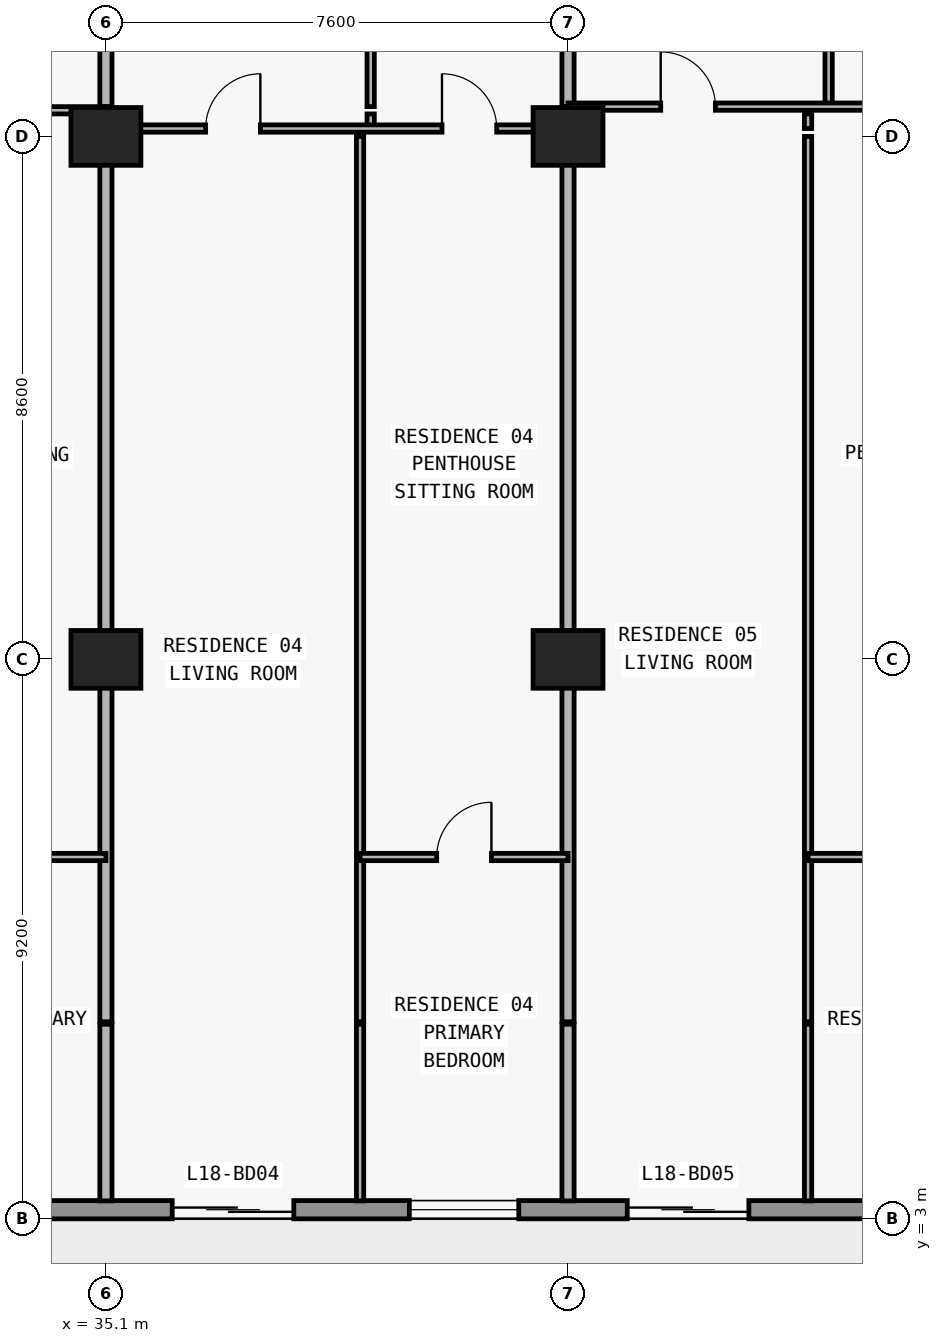
"""IFC4 building model, lengths in metres.
Left out: names, types, materials, properties, quantities, classifications, styles, units other than length and angle.
Written with IfcOpenShell. Run it as: python <this file> out.ifc"""

import sys

from ifc_helpers import new_model, si_unit, direction, frame, frame_2d, origin, origin_2d, place, context, subcontext, project, spatial, rectangle, extrude, element, fill, save


model = new_model("IFC4")
c1 = context("Model", 3, precision=1e-05, world=origin(), true_north=direction((0.0, 1.0)))
c2 = subcontext(c1, "Body", "Model", "MODEL_VIEW")
j1 = project(units=[si_unit("LENGTHUNIT", "METRE"), si_unit("PLANEANGLEUNIT", "RADIAN")], contexts=[c1])
p1 = place(None, origin())
s1 = spatial("IfcSite", under=j1, at=p1, CompositionType="ELEMENT")
p2 = place(p1, origin())
s2 = spatial("IfcBuilding", under=s1, at=p2, CompositionType="ELEMENT")
p3 = place(p2, frame((0.0, 0.0, 69.6)))
s3 = spatial("IfcBuildingStorey", under=s2, at=p3, CompositionType="ELEMENT", Elevation=69.6)
for number, where, z_axis, x_axis in (
    (1, (35.1, 12.2, 0.0), (0.0, 0.0, 1.0), (1.0, 0.0, 0.0)),
    (2, (42.7, 12.2, 0.0), (0.0, 0.0, 1.0), (1.0, 0.0, 0.0)),
    (3, (35.1, 20.8, 0.0), (0.0, 0.0, 1.0), (1.0, 0.0, 0.0)),
    (4, (42.7, 20.8, 0.0), (0.0, 0.0, 1.0), (1.0, 0.0, 0.0)),
):
    element("IfcColumn", number, at=place(p3, frame(where, z_axis=z_axis, x_axis=x_axis)), inside=s3, PredefinedType="COLUMN", context=c2, shape_type="SweptSolid", body=[
        extrude(rectangle(XDim=1.15, YDim=0.95, at=origin_2d()), origin(), (0.0, 0.0, 1.0), 3.05),
    ])
p4 = place(p3, frame((72.7, 3.15, 0.0), z_axis=(0.0, 0.0, 1.0), x_axis=(-1.0, 0.0, 0.0)))
e5 = element("IfcWall", 5, at=p4, inside=s3, PredefinedType="STANDARD", context=c2, shape_type="SweptSolid", body=[
    extrude(rectangle(XDim=67.6, YDim=0.3, at=frame_2d((33.8, 0.0))), origin(), (0.0, 0.0, 1.0), 3.05),
])
p5 = place(p4, frame((59.826, 0.0, 0.0)))
e6 = element("IfcOpeningElement", 6, at=p5, cuts=e5, PredefinedType="OPENING", context=c2, shape_type="SweptSolid", body=[
    extrude(rectangle(XDim=2.0, YDim=2.3, at=frame_2d((1.0, 1.15))), frame((0.0, 0.16, 0.0), z_axis=(0.0, -1.0, 0.0), x_axis=(1.0, 0.0, 0.0)), (0.0, 0.0, 1.0), 0.32),
])
p6 = place(p4, frame((55.526, 0.0, 0.85)))
e7 = element("IfcOpeningElement", 7, at=p6, cuts=e5, PredefinedType="OPENING", context=c2, shape_type="SweptSolid", body=[
    extrude(rectangle(XDim=2.2, YDim=1.55, at=frame_2d((1.1, 0.775))), frame((0.0, 0.16, 0.0), z_axis=(0.0, -1.0, 0.0), x_axis=(1.0, 0.0, 0.0)), (0.0, 0.0, 1.0), 0.32),
])
p7 = place(p4, frame((51.09, 0.0, 0.0)))
e8 = element("IfcOpeningElement", 8, at=p7, cuts=e5, PredefinedType="OPENING", context=c2, shape_type="SweptSolid", body=[
    extrude(rectangle(XDim=2.0, YDim=2.3, at=frame_2d((1.0, 1.15))), frame((0.0, 0.16, 0.0), z_axis=(0.0, -1.0, 0.0), x_axis=(1.0, 0.0, 0.0)), (0.0, 0.0, 1.0), 0.32),
])
p8 = place(p4, frame((46.99, 0.0, 0.85)))
e9 = element("IfcOpeningElement", 9, at=p8, cuts=e5, PredefinedType="OPENING", context=c2, shape_type="SweptSolid", body=[
    extrude(rectangle(XDim=1.8, YDim=1.55, at=frame_2d((0.9, 0.775))), frame((0.0, 0.16, 0.0), z_axis=(0.0, -1.0, 0.0), x_axis=(1.0, 0.0, 0.0)), (0.0, 0.0, 1.0), 0.32),
])
p9 = place(p4, frame((43.026, 0.0, 0.0)))
e10 = element("IfcOpeningElement", 10, at=p9, cuts=e5, PredefinedType="OPENING", context=c2, shape_type="SweptSolid", body=[
    extrude(rectangle(XDim=2.0, YDim=2.3, at=frame_2d((1.0, 1.15))), frame((0.0, 0.16, 0.0), z_axis=(0.0, -1.0, 0.0), x_axis=(1.0, 0.0, 0.0)), (0.0, 0.0, 1.0), 0.32),
])
p10 = place(p4, frame((38.726, 0.0, 0.85)))
e11 = element("IfcOpeningElement", 11, at=p10, cuts=e5, PredefinedType="OPENING", context=c2, shape_type="SweptSolid", body=[
    extrude(rectangle(XDim=2.2, YDim=1.55, at=frame_2d((1.1, 0.775))), frame((0.0, 0.16, 0.0), z_axis=(0.0, -1.0, 0.0), x_axis=(1.0, 0.0, 0.0)), (0.0, 0.0, 1.0), 0.32),
])
p11 = place(p4, frame((34.51, 0.0, 0.0)))
e12 = element("IfcOpeningElement", 12, at=p11, cuts=e5, PredefinedType="OPENING", context=c2, shape_type="SweptSolid", body=[
    extrude(rectangle(XDim=2.0, YDim=2.3, at=frame_2d((1.0, 1.15))), frame((0.0, 0.16, 0.0), z_axis=(0.0, -1.0, 0.0), x_axis=(1.0, 0.0, 0.0)), (0.0, 0.0, 1.0), 0.32),
])
p12 = place(p4, frame((30.81, 0.0, 0.85)))
e13 = element("IfcOpeningElement", 13, at=p12, cuts=e5, PredefinedType="OPENING", context=c2, shape_type="SweptSolid", body=[
    extrude(rectangle(XDim=1.8, YDim=1.55, at=frame_2d((0.9, 0.775))), frame((0.0, 0.16, 0.0), z_axis=(0.0, -1.0, 0.0), x_axis=(1.0, 0.0, 0.0)), (0.0, 0.0, 1.0), 0.32),
])
p13 = place(p4, frame((27.026, 0.0, 0.0)))
e14 = element("IfcOpeningElement", 14, at=p13, cuts=e5, PredefinedType="OPENING", context=c2, shape_type="SweptSolid", body=[
    extrude(rectangle(XDim=2.0, YDim=2.3, at=frame_2d((1.0, 1.15))), frame((0.0, 0.16, 0.0), z_axis=(0.0, -1.0, 0.0), x_axis=(1.0, 0.0, 0.0)), (0.0, 0.0, 1.0), 0.32),
])
p14 = place(p4, frame((22.726, 0.0, 0.85)))
e15 = element("IfcOpeningElement", 15, at=p14, cuts=e5, PredefinedType="OPENING", context=c2, shape_type="SweptSolid", body=[
    extrude(rectangle(XDim=2.2, YDim=1.55, at=frame_2d((1.1, 0.775))), frame((0.0, 0.16, 0.0), z_axis=(0.0, -1.0, 0.0), x_axis=(1.0, 0.0, 0.0)), (0.0, 0.0, 1.0), 0.32),
])
p15 = place(p4, frame((18.29, 0.0, 0.0)))
e16 = element("IfcOpeningElement", 16, at=p15, cuts=e5, PredefinedType="OPENING", context=c2, shape_type="SweptSolid", body=[
    extrude(rectangle(XDim=2.0, YDim=2.3, at=frame_2d((1.0, 1.15))), frame((0.0, 0.16, 0.0), z_axis=(0.0, -1.0, 0.0), x_axis=(1.0, 0.0, 0.0)), (0.0, 0.0, 1.0), 0.32),
])
p16 = place(p4, frame((14.19, 0.0, 0.85)))
e17 = element("IfcOpeningElement", 17, at=p16, cuts=e5, PredefinedType="OPENING", context=c2, shape_type="SweptSolid", body=[
    extrude(rectangle(XDim=1.8, YDim=1.55, at=frame_2d((0.9, 0.775))), frame((0.0, 0.16, 0.0), z_axis=(0.0, -1.0, 0.0), x_axis=(1.0, 0.0, 0.0)), (0.0, 0.0, 1.0), 0.32),
])
p17 = place(p4, frame((10.226, 0.0, 0.0)))
e18 = element("IfcOpeningElement", 18, at=p17, cuts=e5, PredefinedType="OPENING", context=c2, shape_type="SweptSolid", body=[
    extrude(rectangle(XDim=2.0, YDim=2.3, at=frame_2d((1.0, 1.15))), frame((0.0, 0.16, 0.0), z_axis=(0.0, -1.0, 0.0), x_axis=(1.0, 0.0, 0.0)), (0.0, 0.0, 1.0), 0.32),
])
p18 = place(p4, frame((5.926, 0.0, 0.85)))
e19 = element("IfcOpeningElement", 19, at=p18, cuts=e5, PredefinedType="OPENING", context=c2, shape_type="SweptSolid", body=[
    extrude(rectangle(XDim=2.2, YDim=1.55, at=frame_2d((1.1, 0.775))), frame((0.0, 0.16, 0.0), z_axis=(0.0, -1.0, 0.0), x_axis=(1.0, 0.0, 0.0)), (0.0, 0.0, 1.0), 0.32),
])
p19 = place(p3, frame((35.1, 3.295, 0.0), z_axis=(0.0, 0.0, 1.0), x_axis=(0.0, 1.0, 0.0)))
e20 = element("IfcWall", 20, at=p19, inside=s3, PredefinedType="PARTITIONING", context=c2, shape_type="SweptSolid", body=[
    extrude(rectangle(XDim=2.905, YDim=0.2, at=frame_2d((1.453, 0.0))), origin(), (0.0, 0.0, 1.0), 3.05),
])
p20 = place(p3, frame((35.1, 6.24, 0.0), z_axis=(0.0, 0.0, 1.0), x_axis=(0.0, 1.0, 0.0)))
e21 = element("IfcWall", 21, at=p20, inside=s3, PredefinedType="PARTITIONING", context=c2, shape_type="SweptSolid", body=[
    extrude(rectangle(XDim=14.56, YDim=0.2, at=frame_2d((7.28, 0.0))), origin(), (0.0, 0.0, 1.0), 2.11),
])
p21 = place(p3, frame((35.1, 20.93, 0.0), z_axis=(0.0, 0.0, 1.0), x_axis=(0.0, 1.0, 0.0)))
e22 = element("IfcWall", 22, at=p21, inside=s3, PredefinedType="PARTITIONING", context=c2, shape_type="SweptSolid", body=[
    extrude(rectangle(XDim=0.24, YDim=0.2, at=frame_2d((0.12, 0.0))), origin(), (0.0, 0.0, 1.0), 3.05),
])
p22 = place(p3, frame((35.1, 21.29, 0.0), z_axis=(0.0, 0.0, 1.0), x_axis=(0.0, 1.0, 0.0)))
e23 = element("IfcWall", 23, at=p22, inside=s3, PredefinedType="PARTITIONING", context=c2, shape_type="SweptSolid", body=[
    extrude(rectangle(XDim=4.69, YDim=0.2, at=frame_2d((2.345, 0.0))), origin(), (0.0, 0.0, 1.0), 2.11),
])
p23 = place(p3, frame((39.28, 3.295, 0.0), z_axis=(0.0, 0.0, 1.0), x_axis=(0.0, 1.0, 0.0)))
e24 = element("IfcWall", 24, at=p23, inside=s3, PredefinedType="PARTITIONING", context=c2, shape_type="SweptSolid", body=[
    extrude(rectangle(XDim=2.905, YDim=0.12, at=frame_2d((1.453, 0.0))), origin(), (0.0, 0.0, 1.0), 3.05),
])
p24 = place(p3, frame((39.28, 6.24, 0.0), z_axis=(0.0, 0.0, 1.0), x_axis=(0.0, 1.0, 0.0)))
e25 = element("IfcWall", 25, at=p24, inside=s3, PredefinedType="PARTITIONING", context=c2, shape_type="SweptSolid", body=[
    extrude(rectangle(XDim=14.56, YDim=0.12, at=frame_2d((7.28, 0.0))), origin(), (0.0, 0.0, 1.0), 3.05),
])
p25 = place(p3, frame((39.454, 20.93, 0.0), z_axis=(0.0, 0.0, 1.0), x_axis=(0.0, 1.0, 0.0)))
e26 = element("IfcWall", 26, at=p25, inside=s3, PredefinedType="PARTITIONING", context=c2, shape_type="SweptSolid", body=[
    extrude(rectangle(XDim=0.24, YDim=0.12, at=frame_2d((0.12, 0.0))), origin(), (0.0, 0.0, 1.0), 3.05),
])
p26 = place(p3, frame((39.454, 21.29, 0.0), z_axis=(0.0, 0.0, 1.0), x_axis=(0.0, 1.0, 0.0)))
e27 = element("IfcWall", 27, at=p26, inside=s3, PredefinedType="PARTITIONING", context=c2, shape_type="SweptSolid", body=[
    extrude(rectangle(XDim=4.69, YDim=0.12, at=frame_2d((2.345, 0.0))), origin(), (0.0, 0.0, 1.0), 3.05),
])
p27 = place(p26, frame((1.895, 0.0, 0.0)))
e28 = element("IfcOpeningElement", 28, at=p27, cuts=e27, PredefinedType="OPENING", context=c2, shape_type="SweptSolid", body=[
    extrude(rectangle(XDim=0.9, YDim=2.15, at=frame_2d((0.45, 1.075))), frame((0.0, 0.07, 0.0), z_axis=(0.0, -1.0, 0.0), x_axis=(1.0, 0.0, 0.0)), (0.0, 0.0, 1.0), 0.14),
])
p28 = place(p3, frame((42.7, 3.295, 0.0), z_axis=(0.0, 0.0, 1.0), x_axis=(0.0, 1.0, 0.0)))
e29 = element("IfcWall", 29, at=p28, inside=s3, PredefinedType="PARTITIONING", context=c2, shape_type="SweptSolid", body=[
    extrude(rectangle(XDim=2.905, YDim=0.2, at=frame_2d((1.453, 0.0))), origin(), (0.0, 0.0, 1.0), 3.05),
])
p29 = place(p3, frame((42.7, 6.24, 0.0), z_axis=(0.0, 0.0, 1.0), x_axis=(0.0, 1.0, 0.0)))
e30 = element("IfcWall", 30, at=p29, inside=s3, PredefinedType="PARTITIONING", context=c2, shape_type="SweptSolid", body=[
    extrude(rectangle(XDim=14.56, YDim=0.2, at=frame_2d((7.28, 0.0))), origin(), (0.0, 0.0, 1.0), 2.11),
])
p30 = place(p3, frame((42.7, 20.93, 0.0), z_axis=(0.0, 0.0, 1.0), x_axis=(0.0, 1.0, 0.0)))
e31 = element("IfcWall", 31, at=p30, inside=s3, PredefinedType="PARTITIONING", context=c2, shape_type="SweptSolid", body=[
    extrude(rectangle(XDim=0.24, YDim=0.2, at=frame_2d((0.12, 0.0))), origin(), (0.0, 0.0, 1.0), 3.05),
])
p31 = place(p3, frame((42.7, 21.29, 0.0), z_axis=(0.0, 0.0, 1.0), x_axis=(0.0, 1.0, 0.0)))
e32 = element("IfcWall", 32, at=p31, inside=s3, PredefinedType="PARTITIONING", context=c2, shape_type="SweptSolid", body=[
    extrude(rectangle(XDim=4.69, YDim=0.2, at=frame_2d((2.345, 0.0))), origin(), (0.0, 0.0, 1.0), 2.11),
])
p32 = place(p3, frame((46.648, 3.295, 0.0), z_axis=(0.0, 0.0, 1.0), x_axis=(0.0, 1.0, 0.0)))
e33 = element("IfcWall", 33, at=p32, inside=s3, PredefinedType="PARTITIONING", context=c2, shape_type="SweptSolid", body=[
    extrude(rectangle(XDim=2.905, YDim=0.12, at=frame_2d((1.453, 0.0))), origin(), (0.0, 0.0, 1.0), 3.05),
])
p33 = place(p3, frame((46.648, 6.24, 0.0), z_axis=(0.0, 0.0, 1.0), x_axis=(0.0, 1.0, 0.0)))
e34 = element("IfcWall", 34, at=p33, inside=s3, PredefinedType="PARTITIONING", context=c2, shape_type="SweptSolid", body=[
    extrude(rectangle(XDim=14.56, YDim=0.12, at=frame_2d((7.28, 0.0))), origin(), (0.0, 0.0, 1.0), 3.05),
])
p34 = place(p3, frame((46.648, 20.93, 0.0), z_axis=(0.0, 0.0, 1.0), x_axis=(0.0, 1.0, 0.0)))
e35 = element("IfcWall", 35, at=p34, inside=s3, PredefinedType="PARTITIONING", context=c2, shape_type="SweptSolid", body=[
    extrude(rectangle(XDim=0.24, YDim=0.12, at=frame_2d((0.12, 0.0))), origin(), (0.0, 0.0, 1.0), 3.05),
])
p35 = place(p3, frame((46.986, 21.29, 0.0), z_axis=(0.0, 0.0, 1.0), x_axis=(0.0, 1.0, 0.0)))
e36 = element("IfcWall", 36, at=p35, inside=s3, PredefinedType="PARTITIONING", context=c2, shape_type="SweptSolid", body=[
    extrude(rectangle(XDim=4.69, YDim=0.12, at=frame_2d((2.345, 0.0))), origin(), (0.0, 0.0, 1.0), 3.05),
])
p36 = place(p35, frame((1.895, 0.0, 0.0)))
e37 = element("IfcOpeningElement", 37, at=p36, cuts=e36, PredefinedType="OPENING", context=c2, shape_type="SweptSolid", body=[
    extrude(rectangle(XDim=0.9, YDim=2.15, at=frame_2d((0.45, 1.075))), frame((0.0, 0.07, 0.0), z_axis=(0.0, -1.0, 0.0), x_axis=(1.0, 0.0, 0.0)), (0.0, 0.0, 1.0), 0.14),
])
p37 = place(p3, frame((30.648, 8.95, 0.0), z_axis=(0.0, 0.0, 1.0), x_axis=(1.0, 0.0, 0.0)))
e38 = element("IfcWall", 38, at=p37, inside=s3, PredefinedType="PARTITIONING", context=c2, shape_type="SweptSolid", body=[
    extrude(rectangle(XDim=4.452, YDim=0.12, at=frame_2d((2.226, 0.0))), origin(), (0.0, 0.0, 1.0), 3.05),
])
p38 = place(p37, frame((1.776, 0.0, 0.0)))
e39 = element("IfcOpeningElement", 39, at=p38, cuts=e38, PredefinedType="OPENING", context=c2, shape_type="SweptSolid", body=[
    extrude(rectangle(XDim=0.9, YDim=2.15, at=frame_2d((0.45, 1.075))), frame((0.0, 0.07, 0.0), z_axis=(0.0, -1.0, 0.0), x_axis=(1.0, 0.0, 0.0)), (0.0, 0.0, 1.0), 0.14),
])
p39 = place(p3, frame((39.28, 8.95, 0.0), z_axis=(0.0, 0.0, 1.0), x_axis=(1.0, 0.0, 0.0)))
e40 = element("IfcWall", 40, at=p39, inside=s3, PredefinedType="PARTITIONING", context=c2, shape_type="SweptSolid", body=[
    extrude(rectangle(XDim=3.42, YDim=0.12, at=frame_2d((1.71, 0.0))), origin(), (0.0, 0.0, 1.0), 3.05),
])
p40 = place(p39, frame((1.26, 0.0, 0.0)))
e41 = element("IfcOpeningElement", 41, at=p40, cuts=e40, PredefinedType="OPENING", context=c2, shape_type="SweptSolid", body=[
    extrude(rectangle(XDim=0.9, YDim=2.15, at=frame_2d((0.45, 1.075))), frame((0.0, 0.07, 0.0), z_axis=(0.0, -1.0, 0.0), x_axis=(1.0, 0.0, 0.0)), (0.0, 0.0, 1.0), 0.14),
])
p41 = place(p3, frame((46.648, 8.95, 0.0), z_axis=(0.0, 0.0, 1.0), x_axis=(1.0, 0.0, 0.0)))
e42 = element("IfcWall", 42, at=p41, inside=s3, PredefinedType="PARTITIONING", context=c2, shape_type="SweptSolid", body=[
    extrude(rectangle(XDim=4.452, YDim=0.12, at=frame_2d((2.226, 0.0))), origin(), (0.0, 0.0, 1.0), 3.05),
])
p42 = place(p41, frame((1.776, 0.0, 0.0)))
e43 = element("IfcOpeningElement", 43, at=p42, cuts=e42, PredefinedType="OPENING", context=c2, shape_type="SweptSolid", body=[
    extrude(rectangle(XDim=0.9, YDim=2.15, at=frame_2d((0.45, 1.075))), frame((0.0, 0.07, 0.0), z_axis=(0.0, -1.0, 0.0), x_axis=(1.0, 0.0, 0.0)), (0.0, 0.0, 1.0), 0.14),
])
p43 = place(p3, frame((35.1, 20.93, 0.0), z_axis=(0.0, 0.0, 1.0), x_axis=(1.0, 0.0, 0.0)))
e44 = element("IfcWall", 44, at=p43, inside=s3, PredefinedType="PARTITIONING", context=c2, shape_type="SweptSolid", body=[
    extrude(rectangle(XDim=7.6, YDim=0.12, at=frame_2d((3.8, 0.0))), origin(), (0.0, 0.0, 1.0), 2.11),
])
p44 = place(p43, frame((1.64, 0.0, 0.0)))
e45 = element("IfcOpeningElement", 45, at=p44, cuts=e44, PredefinedType="OPENING", context=c2, shape_type="SweptSolid", body=[
    extrude(rectangle(XDim=0.9, YDim=2.06, at=frame_2d((0.45, 1.03))), frame((0.0, 0.07, 0.0), z_axis=(0.0, -1.0, 0.0), x_axis=(1.0, 0.0, 0.0)), (0.0, 0.0, 1.0), 0.14),
])
p45 = place(p43, frame((5.527, 0.0, 0.0)))
e46 = element("IfcOpeningElement", 46, at=p45, cuts=e44, PredefinedType="OPENING", context=c2, shape_type="SweptSolid", body=[
    extrude(rectangle(XDim=0.9, YDim=2.06, at=frame_2d((0.45, 1.03))), frame((0.0, 0.07, 0.0), z_axis=(0.0, -1.0, 0.0), x_axis=(1.0, 0.0, 0.0)), (0.0, 0.0, 1.0), 0.14),
])
p46 = place(p3, frame((26.97, 21.23, 0.0), z_axis=(0.0, 0.0, 1.0), x_axis=(1.0, 0.0, 0.0)))
e47 = element("IfcWall", 47, at=p46, inside=s3, PredefinedType="PARTITIONING", context=c2, shape_type="SweptSolid", body=[
    extrude(rectangle(XDim=8.13, YDim=0.12, at=frame_2d((4.065, 0.0))), origin(), (0.0, 0.0, 1.0), 3.05),
])
p47 = place(p46, frame((1.389, 0.0, 0.0)))
e48 = element("IfcOpeningElement", 48, at=p47, cuts=e47, PredefinedType="OPENING", context=c2, shape_type="SweptSolid", body=[
    extrude(rectangle(XDim=0.9, YDim=2.15, at=frame_2d((0.45, 1.075))), frame((0.0, 0.07, 0.0), z_axis=(0.0, -1.0, 0.0), x_axis=(1.0, 0.0, 0.0)), (0.0, 0.0, 1.0), 0.14),
])
p48 = place(p46, frame((5.748, 0.0, 0.0)))
e49 = element("IfcOpeningElement", 49, at=p48, cuts=e47, PredefinedType="OPENING", context=c2, shape_type="SweptSolid", body=[
    extrude(rectangle(XDim=0.9, YDim=2.15, at=frame_2d((0.45, 1.075))), frame((0.0, 0.07, 0.0), z_axis=(0.0, -1.0, 0.0), x_axis=(1.0, 0.0, 0.0)), (0.0, 0.0, 1.0), 0.14),
])
p49 = place(p3, frame((42.7, 21.29, 0.0), z_axis=(0.0, 0.0, 1.0), x_axis=(1.0, 0.0, 0.0)))
e50 = element("IfcWall", 50, at=p49, inside=s3, PredefinedType="PARTITIONING", context=c2, shape_type="SweptSolid", body=[
    extrude(rectangle(XDim=8.13, YDim=0.12, at=frame_2d((4.065, 0.0))), origin(), (0.0, 0.0, 1.0), 3.05),
])
p50 = place(p49, frame((1.524, 0.0, 0.0)))
e51 = element("IfcOpeningElement", 51, at=p50, cuts=e50, PredefinedType="OPENING", context=c2, shape_type="SweptSolid", body=[
    extrude(rectangle(XDim=0.9, YDim=2.15, at=frame_2d((0.45, 1.075))), frame((0.0, 0.07, 0.0), z_axis=(0.0, -1.0, 0.0), x_axis=(1.0, 0.0, 0.0)), (0.0, 0.0, 1.0), 0.14),
])
p51 = place(p49, frame((5.758, 0.0, 0.0)))
e52 = element("IfcOpeningElement", 52, at=p51, cuts=e50, PredefinedType="OPENING", context=c2, shape_type="SweptSolid", body=[
    extrude(rectangle(XDim=0.9, YDim=2.15, at=frame_2d((0.45, 1.075))), frame((0.0, 0.07, 0.0), z_axis=(0.0, -1.0, 0.0), x_axis=(1.0, 0.0, 0.0)), (0.0, 0.0, 1.0), 0.14),
])
p52 = place(p11, origin())
e53 = element("IfcDoor", 53, at=p52, inside=s3, OperationType="DOUBLE_DOOR_SLIDING", PredefinedType="DOOR", context=c2, shape_type="SweptSolid", body=[
    extrude(rectangle(XDim=2.0, YDim=2.3, at=frame_2d((1.0, 1.15))), frame((0.0, 0.025, 0.0), z_axis=(0.0, -1.0, 0.0), x_axis=(1.0, 0.0, 0.0)), (0.0, 0.0, 1.0), 0.05),
])
fill(e12, e53)
p53 = place(p12, origin())
e54 = element("IfcWindow", 54, at=p53, inside=s3, PartitioningType="SINGLE_PANEL", PredefinedType="WINDOW", context=c2, shape_type="SweptSolid", body=[
    extrude(rectangle(XDim=1.8, YDim=1.55, at=frame_2d((0.9, 0.775))), frame((0.0, 0.03, 0.0), z_axis=(0.0, -1.0, 0.0), x_axis=(1.0, 0.0, 0.0)), (0.0, 0.0, 1.0), 0.06),
])
fill(e13, e54)
p54 = place(p13, origin())
e55 = element("IfcDoor", 55, at=p54, inside=s3, OperationType="DOUBLE_DOOR_SLIDING", PredefinedType="DOOR", context=c2, shape_type="SweptSolid", body=[
    extrude(rectangle(XDim=2.0, YDim=2.3, at=frame_2d((1.0, 1.15))), frame((0.0, 0.025, 0.0), z_axis=(0.0, -1.0, 0.0), x_axis=(1.0, 0.0, 0.0)), (0.0, 0.0, 1.0), 0.05),
])
fill(e14, e55)
p55 = place(p44, origin())
e56 = element("IfcDoor", 56, at=p55, inside=s3, OperationType="SINGLE_SWING_RIGHT", PredefinedType="DOOR", context=c2, shape_type="SweptSolid", body=[
    extrude(rectangle(XDim=0.9, YDim=2.06, at=frame_2d((0.45, 1.03))), frame((0.0, 0.025, 0.0), z_axis=(0.0, -1.0, 0.0), x_axis=(1.0, 0.0, 0.0)), (0.0, 0.0, 1.0), 0.05),
])
fill(e45, e56)
p56 = place(p45, origin())
e57 = element("IfcDoor", 57, at=p56, inside=s3, OperationType="SINGLE_SWING_LEFT", PredefinedType="DOOR", context=c2, shape_type="SweptSolid", body=[
    extrude(rectangle(XDim=0.9, YDim=2.06, at=frame_2d((0.45, 1.03))), frame((0.0, 0.025, 0.0), z_axis=(0.0, -1.0, 0.0), x_axis=(1.0, 0.0, 0.0)), (0.0, 0.0, 1.0), 0.05),
])
fill(e46, e57)
p57 = place(p40, origin())
e58 = element("IfcDoor", 58, at=p57, inside=s3, OperationType="SINGLE_SWING_RIGHT", PredefinedType="DOOR", context=c2, shape_type="SweptSolid", body=[
    extrude(rectangle(XDim=0.9, YDim=2.15, at=frame_2d((0.45, 1.075))), frame((0.0, 0.025, 0.0), z_axis=(0.0, -1.0, 0.0), x_axis=(1.0, 0.0, 0.0)), (0.0, 0.0, 1.0), 0.05),
])
fill(e41, e58)
p58 = place(p50, origin())
e59 = element("IfcDoor", 59, at=p58, inside=s3, OperationType="SINGLE_SWING_LEFT", PredefinedType="DOOR", context=c2, shape_type="SweptSolid", body=[
    extrude(rectangle(XDim=0.9, YDim=2.15, at=frame_2d((0.45, 1.075))), frame((0.0, 0.025, 0.0), z_axis=(0.0, -1.0, 0.0), x_axis=(1.0, 0.0, 0.0)), (0.0, 0.0, 1.0), 0.05),
])
fill(e51, e59)
save(model, sys.argv[1])
